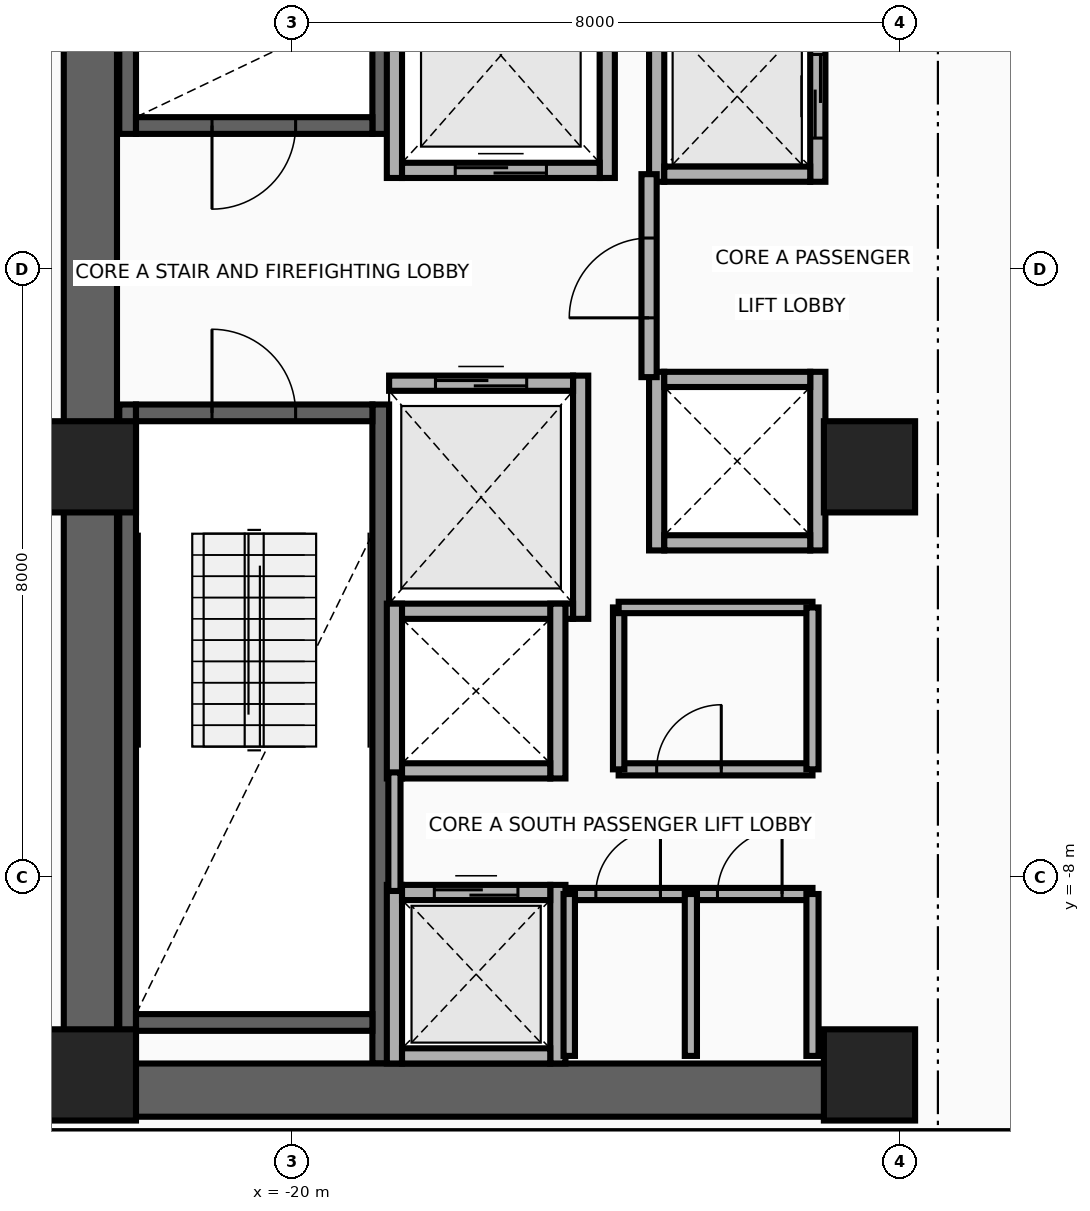
"""IFC4 building model, lengths in metres.
Left out: names, types, materials, properties, quantities, classifications, styles, units other than length and angle.
Written with IfcOpenShell. Run it as: python <this file> out.ifc"""

import sys

from ifc_helpers import new_model, si_unit, direction, frame, frame_2d, origin, origin_2d, place, context, subcontext, project, spatial, rectangle, extrude, source, transform, mapped, element, fill, save


model = new_model("IFC4")
c1 = context("Model", 3, precision=1e-05, world=origin(), true_north=direction((0.0, 1.0)))
c2 = subcontext(c1, "Body", "Model", "MODEL_VIEW")
j1 = project(units=[si_unit("LENGTHUNIT", "METRE"), si_unit("PLANEANGLEUNIT", "RADIAN")], contexts=[c1])
p1 = place(None, origin())
s1 = spatial("IfcSite", under=j1, at=p1, CompositionType="ELEMENT")
p2 = place(p1, origin())
s2 = spatial("IfcBuilding", under=s1, at=p2, CompositionType="ELEMENT")
p3 = place(p2, frame((0.0, 0.0, 131.6)))
s3 = spatial("IfcBuildingStorey", under=s2, at=p3, CompositionType="ELEMENT", Elevation=131.6)
for number, where, z_axis, x_axis in (
    (1, (-22.16, 1.78, 0.0), (0.0, 0.0, 1.0), (0.0, 1.0, 0.0)),
    (2, (-18.83, 1.78, 0.0), (0.0, 0.0, 1.0), (0.0, 1.0, 0.0)),
):
    element("IfcWall", number, at=place(p3, frame(where, z_axis=z_axis, x_axis=x_axis)), inside=s3, PredefinedType="SHEAR", context=c2, shape_type="SweptSolid", body=[
        extrude(rectangle(XDim=8.67, YDim=0.22, at=frame_2d((4.335, 0.0))), origin(), (0.0, 0.0, 1.0), 3.46),
    ])
p4 = place(p3, frame((-22.05, 1.89, 0.0), z_axis=(0.0, 0.0, 1.0), x_axis=(1.0, 0.0, 0.0)))
e3 = element("IfcWall", 3, at=p4, inside=s3, PredefinedType="SHEAR", context=c2, shape_type="SweptSolid", body=[
    extrude(rectangle(XDim=3.11, YDim=0.22, at=frame_2d((1.555, 0.0))), origin(), (0.0, 0.0, 1.0), 3.46),
])
p5 = place(p4, frame((1.0, 0.0, 0.0)))
e4 = element("IfcOpeningElement", 4, at=p5, cuts=e3, PredefinedType="OPENING", context=c2, shape_type="SweptSolid", body=[
    extrude(rectangle(XDim=1.1, YDim=2.15, at=frame_2d((0.55, 1.075))), frame((0.0, 0.125, 0.0), z_axis=(0.0, -1.0, 0.0), x_axis=(1.0, 0.0, 0.0)), (0.0, 0.0, 1.0), 0.25),
])
for number, where, z_axis, x_axis in (
    (5, (-22.16, -10.45, 0.0), (0.0, 0.0, 1.0), (0.0, 1.0, 0.0)),
    (6, (-18.83, -10.45, 0.0), (0.0, 0.0, 1.0), (0.0, 1.0, 0.0)),
):
    element("IfcWall", number, at=place(p3, frame(where, z_axis=z_axis, x_axis=x_axis)), inside=s3, PredefinedType="SHEAR", context=c2, shape_type="SweptSolid", body=[
        extrude(rectangle(XDim=8.67, YDim=0.22, at=frame_2d((4.335, 0.0))), origin(), (0.0, 0.0, 1.0), 3.46),
    ])
p6 = place(p3, frame((-22.05, -9.91, 0.0), z_axis=(0.0, 0.0, 1.0), x_axis=(1.0, 0.0, 0.0)))
e7 = element("IfcWall", 7, at=p6, inside=s3, PredefinedType="SHEAR", context=c2, shape_type="SweptSolid", body=[
    extrude(rectangle(XDim=3.11, YDim=0.22, at=frame_2d((1.555, 0.0))), origin(), (0.0, 0.0, 1.0), 3.46),
])
p7 = place(p3, frame((-22.05, -1.89, 0.0), z_axis=(0.0, 0.0, 1.0), x_axis=(1.0, 0.0, 0.0)))
e8 = element("IfcWall", 8, at=p7, inside=s3, PredefinedType="SHEAR", context=c2, shape_type="SweptSolid", body=[
    extrude(rectangle(XDim=3.11, YDim=0.22, at=frame_2d((1.555, 0.0))), origin(), (0.0, 0.0, 1.0), 3.46),
])
p8 = place(p7, frame((1.0, 0.0, 0.0)))
e9 = element("IfcOpeningElement", 9, at=p8, cuts=e8, PredefinedType="OPENING", context=c2, shape_type="SweptSolid", body=[
    extrude(rectangle(XDim=1.1, YDim=2.15, at=frame_2d((0.55, 1.075))), frame((0.0, 0.125, 0.0), z_axis=(0.0, -1.0, 0.0), x_axis=(1.0, 0.0, 0.0)), (0.0, 0.0, 1.0), 0.25),
])
p9 = place(p3, frame((-22.65, -11.15, 0.0), z_axis=(0.0, 0.0, 1.0), x_axis=(0.0, 1.0, 0.0)))
e10 = element("IfcWall", 10, at=p9, inside=s3, PredefinedType="SHEAR", context=c2, shape_type="SweptSolid", body=[
    extrude(rectangle(XDim=22.3, YDim=0.7, at=frame_2d((11.15, 0.0))), origin(), (0.0, 0.0, 1.0), 3.46),
])
p10 = place(p3, frame((-22.65, -10.8, 0.0), z_axis=(0.0, 0.0, 1.0), x_axis=(1.0, 0.0, 0.0)))
e11 = element("IfcWall", 11, at=p10, inside=s3, PredefinedType="SHEAR", context=c2, shape_type="SweptSolid", body=[
    extrude(rectangle(XDim=10.25, YDim=0.7, at=frame_2d((5.125, 0.0))), origin(), (0.0, 0.0, 1.0), 3.46),
])
m1 = source(origin(), c2, "Body", "SweptSolid", [
    extrude(rectangle(XDim=1.2, YDim=1.2, at=origin_2d()), origin(), (0.0, 0.0, 1.0), 3.7),
])
for number, where, z_axis, x_axis in (
    (12, (-22.65, -10.6, 0.0), (0.0, 0.0, 1.0), (1.0, 0.0, 0.0)),
    (13, (-12.4, -10.6, 0.0), (0.0, 0.0, 1.0), (1.0, 0.0, 0.0)),
    (14, (-22.65, -2.6, 0.0), (0.0, 0.0, 1.0), (1.0, 0.0, 0.0)),
    (15, (-12.4, -2.6, 0.0), (0.0, 0.0, 1.0), (1.0, 0.0, 0.0)),
):
    element("IfcColumn", number, at=place(p3, frame(where, z_axis=z_axis, x_axis=x_axis)), inside=s3, PredefinedType="COLUMN", context=c2, shape_type="MappedRepresentation", body=[
        mapped(m1, transform((0.0, 0.0, 0.0), x_axis=(1.0, 0.0, 0.0), y_axis=(0.0, 1.0, 0.0), z_axis=(0.0, 0.0, 1.0), scale=1.0)),
    ])
for number, where, z_axis, x_axis in (
    (16, (-18.65, 1.2, 0.0), (0.0, 0.0, 1.0), (0.0, 1.0, 0.0)),
    (17, (-15.85, 1.2, 0.0), (0.0, 0.0, 1.0), (0.0, 1.0, 0.0)),
):
    element("IfcWall", number, at=place(p3, frame(where, z_axis=z_axis, x_axis=x_axis)), inside=s3, PredefinedType="MOVABLE", context=c2, shape_type="SweptSolid", body=[
        extrude(rectangle(XDim=3.225, YDim=0.2, at=frame_2d((1.613, 0.0))), origin(), (0.0, 0.0, 1.0), 3.46),
    ])
p11 = place(p3, frame((-18.55, 1.3, 0.0), z_axis=(0.0, 0.0, 1.0), x_axis=(1.0, 0.0, 0.0)))
e18 = element("IfcWall", 18, at=p11, inside=s3, PredefinedType="MOVABLE", context=c2, shape_type="SweptSolid", body=[
    extrude(rectangle(XDim=2.6, YDim=0.2, at=frame_2d((1.3, 0.0))), origin(), (0.0, 0.0, 1.0), 3.46),
])
p12 = place(p11, frame((0.7, 0.0, 0.0)))
e19 = element("IfcOpeningElement", 19, at=p12, cuts=e18, PredefinedType="OPENING", context=c2, shape_type="SweptSolid", body=[
    extrude(rectangle(XDim=1.2, YDim=2.1, at=frame_2d((0.6, 1.05))), frame((0.0, 0.115, 0.0), z_axis=(0.0, -1.0, 0.0), x_axis=(1.0, 0.0, 0.0)), (0.0, 0.0, 1.0), 0.23),
])
p13 = place(p3, frame((-16.2, -4.6, 0.0), z_axis=(0.0, 0.0, 1.0), x_axis=(0.0, 1.0, 0.0)))
e20 = element("IfcWall", 20, at=p13, inside=s3, PredefinedType="MOVABLE", context=c2, shape_type="SweptSolid", body=[
    extrude(rectangle(XDim=3.2, YDim=0.2, at=frame_2d((1.6, 0.0))), origin(), (0.0, 0.0, 1.0), 3.46),
])
p14 = place(p3, frame((-18.72, -4.5, 0.0), z_axis=(0.0, 0.0, 1.0), x_axis=(1.0, 0.0, 0.0)))
e21 = element("IfcWall", 21, at=p14, inside=s3, PredefinedType="MOVABLE", context=c2, shape_type="SweptSolid", body=[
    extrude(rectangle(XDim=2.42, YDim=0.2, at=frame_2d((1.21, 0.0))), origin(), (0.0, 0.0, 1.0), 3.46),
])
p15 = place(p3, frame((-18.72, -1.5, 0.0), z_axis=(0.0, 0.0, 1.0), x_axis=(1.0, 0.0, 0.0)))
e22 = element("IfcWall", 22, at=p15, inside=s3, PredefinedType="MOVABLE", context=c2, shape_type="SweptSolid", body=[
    extrude(rectangle(XDim=2.42, YDim=0.2, at=frame_2d((1.21, 0.0))), origin(), (0.0, 0.0, 1.0), 3.46),
])
p16 = place(p15, frame((0.61, 0.0, 0.0)))
e23 = element("IfcOpeningElement", 23, at=p16, cuts=e22, PredefinedType="OPENING", context=c2, shape_type="SweptSolid", body=[
    extrude(rectangle(XDim=1.2, YDim=2.1, at=frame_2d((0.6, 1.05))), frame((0.0, 0.115, 0.0), z_axis=(0.0, -1.0, 0.0), x_axis=(1.0, 0.0, 0.0)), (0.0, 0.0, 1.0), 0.23),
])
for number, where, z_axis, x_axis in (
    (24, (-18.65, -10.45, 0.0), (0.0, 0.0, 1.0), (0.0, 1.0, 0.0)),
    (25, (-16.5, -10.45, 0.0), (0.0, 0.0, 1.0), (0.0, 1.0, 0.0)),
):
    element("IfcWall", number, at=place(p3, frame(where, z_axis=z_axis, x_axis=x_axis)), inside=s3, PredefinedType="MOVABLE", context=c2, shape_type="SweptSolid", body=[
        extrude(rectangle(XDim=2.35, YDim=0.2, at=frame_2d((1.175, 0.0))), origin(), (0.0, 0.0, 1.0), 2.666),
    ])
p17 = place(p3, frame((-18.55, -10.35, 0.0), z_axis=(0.0, 0.0, 1.0), x_axis=(1.0, 0.0, 0.0)))
e26 = element("IfcWall", 26, at=p17, inside=s3, PredefinedType="MOVABLE", context=c2, shape_type="SweptSolid", body=[
    extrude(rectangle(XDim=1.95, YDim=0.2, at=frame_2d((0.975, 0.0))), origin(), (0.0, 0.0, 1.0), 2.666),
])
p18 = place(p3, frame((-18.55, -8.2, 0.0), z_axis=(0.0, 0.0, 1.0), x_axis=(1.0, 0.0, 0.0)))
e27 = element("IfcWall", 27, at=p18, inside=s3, PredefinedType="MOVABLE", context=c2, shape_type="SweptSolid", body=[
    extrude(rectangle(XDim=1.95, YDim=0.2, at=frame_2d((0.975, 0.0))), origin(), (0.0, 0.0, 1.0), 3.46),
])
p19 = place(p18, frame((0.425, 0.0, 0.0)))
e28 = element("IfcOpeningElement", 28, at=p19, cuts=e27, PredefinedType="OPENING", context=c2, shape_type="SweptSolid", body=[
    extrude(rectangle(XDim=1.1, YDim=2.1, at=frame_2d((0.55, 1.05))), frame((0.0, 0.115, 0.0), z_axis=(0.0, -1.0, 0.0), x_axis=(1.0, 0.0, 0.0)), (0.0, 0.0, 1.0), 0.23),
])
p20 = place(p3, frame((-15.2, 1.15, 0.0), z_axis=(0.0, 0.0, 1.0), x_axis=(0.0, 1.0, 0.0)))
e29 = element("IfcWall", 29, at=p20, inside=s3, PredefinedType="MOVABLE", context=c2, shape_type="SweptSolid", body=[
    extrude(rectangle(XDim=2.25, YDim=0.2, at=frame_2d((1.125, 0.0))), origin(), (0.0, 0.0, 1.0), 3.46),
])
p21 = place(p3, frame((-13.08, 1.15, 0.0), z_axis=(0.0, 0.0, 1.0), x_axis=(0.0, 1.0, 0.0)))
e30 = element("IfcWall", 30, at=p21, inside=s3, PredefinedType="MOVABLE", context=c2, shape_type="SweptSolid", body=[
    extrude(rectangle(XDim=2.25, YDim=0.2, at=frame_2d((1.125, 0.0))), origin(), (0.0, 0.0, 1.0), 3.46),
])
p22 = place(p21, frame((0.575, 0.0, 0.0)))
e31 = element("IfcOpeningElement", 31, at=p22, cuts=e30, PredefinedType="OPENING", context=c2, shape_type="SweptSolid", body=[
    extrude(rectangle(XDim=1.1, YDim=2.1, at=frame_2d((0.55, 1.05))), frame((0.0, 0.115, 0.0), z_axis=(0.0, -1.0, 0.0), x_axis=(1.0, 0.0, 0.0)), (0.0, 0.0, 1.0), 0.23),
])
p23 = place(p3, frame((-15.1, 1.25, 0.0), z_axis=(0.0, 0.0, 1.0), x_axis=(1.0, 0.0, 0.0)))
e32 = element("IfcWall", 32, at=p23, inside=s3, PredefinedType="MOVABLE", context=c2, shape_type="SweptSolid", body=[
    extrude(rectangle(XDim=1.92, YDim=0.2, at=frame_2d((0.96, 0.0))), origin(), (0.0, 0.0, 1.0), 3.46),
])
for number, where, z_axis, x_axis in (
    (33, (-18.65, -6.7, 0.0), (0.0, 0.0, 1.0), (0.0, 1.0, 0.0)),
    (34, (-16.5, -6.7, 0.0), (0.0, 0.0, 1.0), (0.0, 1.0, 0.0)),
):
    element("IfcWall", number, at=place(p3, frame(where, z_axis=z_axis, x_axis=x_axis)), inside=s3, PredefinedType="MOVABLE", context=c2, shape_type="SweptSolid", body=[
        extrude(rectangle(XDim=2.3, YDim=0.2, at=frame_2d((1.15, 0.0))), origin(), (0.0, 0.0, 1.0), 3.46),
    ])
p24 = place(p3, frame((-18.55, -6.6, 0.0), z_axis=(0.0, 0.0, 1.0), x_axis=(1.0, 0.0, 0.0)))
e35 = element("IfcWall", 35, at=p24, inside=s3, PredefinedType="MOVABLE", context=c2, shape_type="SweptSolid", body=[
    extrude(rectangle(XDim=1.95, YDim=0.2, at=frame_2d((0.975, 0.0))), origin(), (0.0, 0.0, 1.0), 3.46),
])
for number, where, z_axis, x_axis in (
    (36, (-15.2, -3.7, 0.0), (0.0, 0.0, 1.0), (0.0, 1.0, 0.0)),
    (37, (-13.08, -3.7, 0.0), (0.0, 0.0, 1.0), (0.0, 1.0, 0.0)),
):
    element("IfcWall", number, at=place(p3, frame(where, z_axis=z_axis, x_axis=x_axis)), inside=s3, PredefinedType="MOVABLE", context=c2, shape_type="SweptSolid", body=[
        extrude(rectangle(XDim=2.35, YDim=0.2, at=frame_2d((1.175, 0.0))), origin(), (0.0, 0.0, 1.0), 3.46),
    ])
for number, where, z_axis, x_axis in (
    (38, (-15.1, -3.6, 0.0), (0.0, 0.0, 1.0), (1.0, 0.0, 0.0)),
    (39, (-15.1, -1.45, 0.0), (0.0, 0.0, 1.0), (1.0, 0.0, 0.0)),
):
    element("IfcWall", number, at=place(p3, frame(where, z_axis=z_axis, x_axis=x_axis)), inside=s3, PredefinedType="MOVABLE", context=c2, shape_type="SweptSolid", body=[
        extrude(rectangle(XDim=1.92, YDim=0.2, at=frame_2d((0.96, 0.0))), origin(), (0.0, 0.0, 1.0), 3.46),
    ])
p25 = place(p3, frame((-15.3, -1.42, 0.0), z_axis=(0.0, 0.0, 1.0), x_axis=(0.0, 1.0, 0.0)))
e40 = element("IfcWall", 40, at=p25, inside=s3, PredefinedType="PARTITIONING", context=c2, shape_type="SweptSolid", body=[
    extrude(rectangle(XDim=2.67, YDim=0.2, at=frame_2d((1.335, 0.0))), origin(), (0.0, 0.0, 1.0), 3.46),
])
p26 = place(p25, frame((0.78, 0.0, 0.0)))
e41 = element("IfcOpeningElement", 41, at=p26, cuts=e40, PredefinedType="OPENING", context=c2, shape_type="SweptSolid", body=[
    extrude(rectangle(XDim=1.05, YDim=2.15, at=frame_2d((0.525, 1.075))), frame((0.0, 0.115, 0.0), z_axis=(0.0, -1.0, 0.0), x_axis=(1.0, 0.0, 0.0)), (0.0, 0.0, 1.0), 0.23),
])
p27 = place(p3, frame((-18.65, -8.18, 0.0), z_axis=(0.0, 0.0, 1.0), x_axis=(0.0, 1.0, 0.0)))
e42 = element("IfcWall", 42, at=p27, inside=s3, PredefinedType="PARTITIONING", context=c2, shape_type="SweptSolid", body=[
    extrude(rectangle(XDim=1.56, YDim=0.16, at=frame_2d((0.78, 0.0))), origin(), (0.0, 0.0, 1.0), 3.46),
])
p28 = place(p3, frame((-16.35, -8.22, 0.0), z_axis=(0.0, 0.0, 1.0), x_axis=(1.0, 0.0, 0.0)))
e43 = element("IfcWall", 43, at=p28, inside=s3, PredefinedType="PARTITIONING", context=c2, shape_type="SweptSolid", body=[
    extrude(rectangle(XDim=3.2, YDim=0.16, at=frame_2d((1.6, 0.0))), origin(), (0.0, 0.0, 1.0), 3.46),
])
p29 = place(p28, frame((0.35, 0.0, 0.0)))
e44 = element("IfcOpeningElement", 44, at=p29, cuts=e43, PredefinedType="OPENING", context=c2, shape_type="SweptSolid", body=[
    extrude(rectangle(XDim=0.85, YDim=2.05, at=frame_2d((0.425, 1.025))), frame((0.0, 0.095, 0.0), z_axis=(0.0, -1.0, 0.0), x_axis=(1.0, 0.0, 0.0)), (0.0, 0.0, 1.0), 0.19),
])
p30 = place(p28, frame((1.95, 0.0, 0.0)))
e45 = element("IfcOpeningElement", 45, at=p30, cuts=e43, PredefinedType="OPENING", context=c2, shape_type="SweptSolid", body=[
    extrude(rectangle(XDim=0.85, YDim=2.05, at=frame_2d((0.425, 1.025))), frame((0.0, 0.095, 0.0), z_axis=(0.0, -1.0, 0.0), x_axis=(1.0, 0.0, 0.0)), (0.0, 0.0, 1.0), 0.19),
])
p31 = place(p3, frame((-16.35, -10.35, 0.0), z_axis=(0.0, 0.0, 1.0), x_axis=(0.0, 1.0, 0.0)))
e46 = element("IfcWall", 46, at=p31, inside=s3, PredefinedType="PARTITIONING", context=c2, shape_type="SweptSolid", body=[
    extrude(rectangle(XDim=2.13, YDim=0.15, at=frame_2d((1.065, 0.0))), origin(), (0.0, 0.0, 1.0), 3.46),
])
for number, where, z_axis, x_axis in (
    (47, (-13.15, -10.35, 0.0), (0.0, 0.0, 1.0), (0.0, 1.0, 0.0)),
    (48, (-14.75, -10.35, 0.0), (0.0, 0.0, 1.0), (0.0, 1.0, 0.0)),
):
    element("IfcWall", number, at=place(p3, frame(where, z_axis=z_axis, x_axis=x_axis)), inside=s3, PredefinedType="PARTITIONING", context=c2, shape_type="SweptSolid", body=[
        extrude(rectangle(XDim=2.13, YDim=0.16, at=frame_2d((1.065, 0.0))), origin(), (0.0, 0.0, 1.0), 3.46),
    ])
p32 = place(p3, frame((-15.7, -6.58, 0.0), z_axis=(0.0, 0.0, 1.0), x_axis=(1.0, 0.0, 0.0)))
e49 = element("IfcWall", 49, at=p32, inside=s3, PredefinedType="PARTITIONING", context=c2, shape_type="SweptSolid", body=[
    extrude(rectangle(XDim=2.55, YDim=0.16, at=frame_2d((1.275, 0.0))), origin(), (0.0, 0.0, 1.0), 3.46),
])
p33 = place(p32, frame((0.5, 0.0, 0.0)))
e50 = element("IfcOpeningElement", 50, at=p33, cuts=e49, PredefinedType="OPENING", context=c2, shape_type="SweptSolid", body=[
    extrude(rectangle(XDim=0.85, YDim=2.05, at=frame_2d((0.425, 1.025))), frame((0.0, 0.095, 0.0), z_axis=(0.0, -1.0, 0.0), x_axis=(1.0, 0.0, 0.0)), (0.0, 0.0, 1.0), 0.19),
])
p34 = place(p3, frame((-15.7, -6.58, 0.0), z_axis=(0.0, 0.0, 1.0), x_axis=(0.0, 1.0, 0.0)))
e51 = element("IfcWall", 51, at=p34, inside=s3, PredefinedType="PARTITIONING", context=c2, shape_type="SweptSolid", body=[
    extrude(rectangle(XDim=2.13, YDim=0.15, at=frame_2d((1.065, 0.0))), origin(), (0.0, 0.0, 1.0), 3.46),
])
p35 = place(p3, frame((-15.7, -4.45, 0.0), z_axis=(0.0, 0.0, 1.0), x_axis=(1.0, 0.0, 0.0)))
e52 = element("IfcWall", 52, at=p35, inside=s3, PredefinedType="PARTITIONING", context=c2, shape_type="SweptSolid", body=[
    extrude(rectangle(XDim=2.55, YDim=0.15, at=frame_2d((1.275, 0.0))), origin(), (0.0, 0.0, 1.0), 3.46),
])
p36 = place(p3, frame((-13.15, -6.58, 0.0), z_axis=(0.0, 0.0, 1.0), x_axis=(0.0, 1.0, 0.0)))
e53 = element("IfcWall", 53, at=p36, inside=s3, PredefinedType="PARTITIONING", context=c2, shape_type="SweptSolid", body=[
    extrude(rectangle(XDim=2.13, YDim=0.16, at=frame_2d((1.065, 0.0))), origin(), (0.0, 0.0, 1.0), 3.46),
])
p37 = place(p3, frame((-23.45, -11.42, 0.0), z_axis=(0.0, 0.0, 1.0), x_axis=(1.0, 0.0, 0.0)))
e54 = element("IfcWall", 54, at=p37, inside=s3, PredefinedType="PARTITIONING", context=c2, shape_type="SweptSolid", body=[
    extrude(rectangle(XDim=13.84, YDim=0.16, at=frame_2d((6.92, 0.0))), origin(), (0.0, 0.0, 1.0), 2.834),
])
p38 = place(p12, origin())
e55 = element("IfcDoor", 55, at=p38, inside=s3, OperationType="DOUBLE_DOOR_SLIDING", PredefinedType="DOOR", context=c2, shape_type="SweptSolid", body=[
    extrude(rectangle(XDim=1.2, YDim=2.1, at=frame_2d((0.6, 1.05))), frame((0.0, 0.025, 0.0), z_axis=(0.0, -1.0, 0.0), x_axis=(1.0, 0.0, 0.0)), (0.0, 0.0, 1.0), 0.05),
])
fill(e19, e55)
p39 = place(p16, origin())
e56 = element("IfcDoor", 56, at=p39, inside=s3, OperationType="DOUBLE_DOOR_SLIDING", PredefinedType="DOOR", context=c2, shape_type="SweptSolid", body=[
    extrude(rectangle(XDim=1.2, YDim=2.1, at=frame_2d((0.6, 1.05))), frame((0.0, 0.025, 0.0), z_axis=(0.0, -1.0, 0.0), x_axis=(1.0, 0.0, 0.0)), (0.0, 0.0, 1.0), 0.05),
])
fill(e23, e56)
p40 = place(p19, origin())
e57 = element("IfcDoor", 57, at=p40, inside=s3, OperationType="DOUBLE_DOOR_SLIDING", PredefinedType="DOOR", context=c2, shape_type="SweptSolid", body=[
    extrude(rectangle(XDim=1.1, YDim=2.1, at=frame_2d((0.55, 1.05))), frame((0.0, 0.025, 0.0), z_axis=(0.0, -1.0, 0.0), x_axis=(1.0, 0.0, 0.0)), (0.0, 0.0, 1.0), 0.05),
])
fill(e28, e57)
p41 = place(p22, origin())
e58 = element("IfcDoor", 58, at=p41, inside=s3, OperationType="DOUBLE_DOOR_SLIDING", PredefinedType="DOOR", context=c2, shape_type="SweptSolid", body=[
    extrude(rectangle(XDim=1.1, YDim=2.1, at=frame_2d((0.55, 1.05))), frame((0.0, 0.025, 0.0), z_axis=(0.0, -1.0, 0.0), x_axis=(1.0, 0.0, 0.0)), (0.0, 0.0, 1.0), 0.05),
])
fill(e31, e58)
p42 = place(p26, origin())
e59 = element("IfcDoor", 59, at=p42, inside=s3, OperationType="SINGLE_SWING_RIGHT", PredefinedType="DOOR", context=c2, shape_type="SweptSolid", body=[
    extrude(rectangle(XDim=1.05, YDim=2.15, at=frame_2d((0.525, 1.075))), frame((0.0, 0.025, 0.0), z_axis=(0.0, -1.0, 0.0), x_axis=(1.0, 0.0, 0.0)), (0.0, 0.0, 1.0), 0.05),
])
fill(e41, e59)
p43 = place(p5, frame((1.1, 0.0, 0.0), z_axis=(0.0, 0.0, 1.0), x_axis=(-1.0, 0.0, 0.0)))
e60 = element("IfcDoor", 60, at=p43, inside=s3, OperationType="SINGLE_SWING_LEFT", PredefinedType="DOOR", context=c2, shape_type="SweptSolid", body=[
    extrude(rectangle(XDim=1.1, YDim=2.15, at=frame_2d((0.55, 1.075))), frame((0.0, 0.025, 0.0), z_axis=(0.0, -1.0, 0.0), x_axis=(1.0, 0.0, 0.0)), (0.0, 0.0, 1.0), 0.05),
])
fill(e4, e60)
p44 = place(p8, origin())
e61 = element("IfcDoor", 61, at=p44, inside=s3, OperationType="SINGLE_SWING_RIGHT", PredefinedType="DOOR", context=c2, shape_type="SweptSolid", body=[
    extrude(rectangle(XDim=1.1, YDim=2.15, at=frame_2d((0.55, 1.075))), frame((0.0, 0.025, 0.0), z_axis=(0.0, -1.0, 0.0), x_axis=(1.0, 0.0, 0.0)), (0.0, 0.0, 1.0), 0.05),
])
fill(e9, e61)
p45 = place(p29, origin())
e62 = element("IfcDoor", 62, at=p45, inside=s3, OperationType="SINGLE_SWING_RIGHT", PredefinedType="DOOR", context=c2, shape_type="SweptSolid", body=[
    extrude(rectangle(XDim=0.85, YDim=2.05, at=frame_2d((0.425, 1.025))), frame((0.0, 0.025, 0.0), z_axis=(0.0, -1.0, 0.0), x_axis=(1.0, 0.0, 0.0)), (0.0, 0.0, 1.0), 0.05),
])
fill(e44, e62)
p46 = place(p30, origin())
e63 = element("IfcDoor", 63, at=p46, inside=s3, OperationType="SINGLE_SWING_LEFT", PredefinedType="DOOR", context=c2, shape_type="SweptSolid", body=[
    extrude(rectangle(XDim=0.85, YDim=2.05, at=frame_2d((0.425, 1.025))), frame((0.0, 0.025, 0.0), z_axis=(0.0, -1.0, 0.0), x_axis=(1.0, 0.0, 0.0)), (0.0, 0.0, 1.0), 0.05),
])
fill(e45, e63)
p47 = place(p33, origin())
e64 = element("IfcDoor", 64, at=p47, inside=s3, OperationType="SINGLE_SWING_RIGHT", PredefinedType="DOOR", context=c2, shape_type="SweptSolid", body=[
    extrude(rectangle(XDim=0.85, YDim=2.05, at=frame_2d((0.425, 1.025))), frame((0.0, 0.025, 0.0), z_axis=(0.0, -1.0, 0.0), x_axis=(1.0, 0.0, 0.0)), (0.0, 0.0, 1.0), 0.05),
])
fill(e50, e64)
save(model, sys.argv[1])
